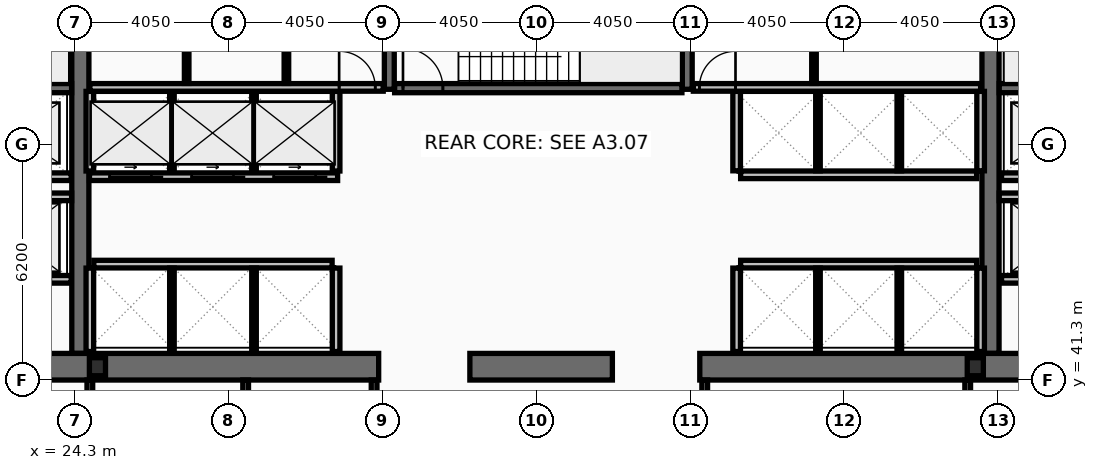
"""IFC4 building model, lengths in metres.
Left out: names, types, materials, properties, quantities, classifications, styles, units other than length and angle.
Written with IfcOpenShell. Run it as: python <this file> out.ifc"""

import sys

from ifc_helpers import new_model, si_unit, direction, frame, frame_2d, origin, origin_2d, place, context, subcontext, project, spatial, rectangle, i_section, extrude, element, fill, save


model = new_model("IFC4")
c1 = context("Model", 3, precision=1e-05, world=origin(), true_north=direction((0.0, 1.0)))
c2 = subcontext(c1, "Body", "Model", "MODEL_VIEW")
j1 = project(units=[si_unit("LENGTHUNIT", "METRE"), si_unit("PLANEANGLEUNIT", "RADIAN")], contexts=[c1])
p1 = place(None, origin())
s1 = spatial("IfcSite", under=j1, at=p1, CompositionType="ELEMENT")
p2 = place(p1, origin())
s2 = spatial("IfcBuilding", under=s1, at=p2, CompositionType="ELEMENT")
p3 = place(p2, frame((0.0, 0.0, 102.6)))
s3 = spatial("IfcBuildingStorey", under=s2, at=p3, CompositionType="ELEMENT", Elevation=102.6)
for number, where, z_axis, x_axis in (
    (1, (24.45, 42.0, 0.0), (0.0, 0.0, 1.0), (0.0, 1.0, 0.0)),
    (2, (48.4, 42.0, 0.0), (0.0, 0.0, 1.0), (0.0, 1.0, 0.0)),
):
    element("IfcWall", number, at=place(p3, frame(where, z_axis=z_axis, x_axis=x_axis)), inside=s3, PredefinedType="SHEAR", context=c2, shape_type="SweptSolid", body=[
        extrude(rectangle(XDim=11.0, YDim=0.45, at=frame_2d((5.5, 0.0))), origin(), (0.0, 0.0, 1.0), 3.8),
    ])
p4 = place(p3, frame((32.3, 41.65, 0.0), z_axis=(0.0, 0.0, 1.0), x_axis=(-1.0, 0.0, 0.0)))
e3 = element("IfcWall", 3, at=p4, inside=s3, PredefinedType="SHEAR", context=c2, shape_type="SweptSolid", body=[
    extrude(rectangle(XDim=11.45, YDim=0.7, at=frame_2d((5.725, 0.0))), origin(), (0.0, 0.0, 1.0), 3.8),
])
p5 = place(p3, frame((38.45, 41.65, 0.0), z_axis=(0.0, 0.0, 1.0), x_axis=(-1.0, 0.0, 0.0)))
e4 = element("IfcWall", 4, at=p5, inside=s3, PredefinedType="SHEAR", context=c2, shape_type="SweptSolid", body=[
    extrude(rectangle(XDim=3.75, YDim=0.7, at=frame_2d((1.875, 0.0))), origin(), (0.0, 0.0, 1.0), 3.8),
])
p6 = place(p3, frame((52.05, 41.65, 0.0), z_axis=(0.0, 0.0, 1.0), x_axis=(-1.0, 0.0, 0.0)))
e5 = element("IfcWall", 5, at=p6, inside=s3, PredefinedType="SHEAR", context=c2, shape_type="SweptSolid", body=[
    extrude(rectangle(XDim=11.3, YDim=0.7, at=frame_2d((5.65, 0.0))), origin(), (0.0, 0.0, 1.0), 3.8),
])
for number, where, z_axis, x_axis in (
    (6, (32.58, 48.95, 0.0), (0.0, 0.0, 1.0), (0.0, 1.0, 0.0)),
    (7, (40.42, 48.95, 0.0), (0.0, 0.0, 1.0), (0.0, 1.0, 0.0)),
):
    element("IfcWall", number, at=place(p3, frame(where, z_axis=z_axis, x_axis=x_axis)), inside=s3, PredefinedType="SHEAR", context=c2, shape_type="SweptSolid", body=[
        extrude(rectangle(XDim=4.05, YDim=0.26, at=frame_2d((2.025, 0.0))), origin(), (0.0, 0.0, 1.0), 3.8),
    ])
p7 = place(p3, frame((16.9, 48.98, 0.0), z_axis=(0.0, 0.0, 1.0), x_axis=(1.0, 0.0, 0.0)))
e8 = element("IfcWall", 8, at=p7, inside=s3, PredefinedType="SHEAR", context=c2, shape_type="SweptSolid", body=[
    extrude(rectangle(XDim=7.32, YDim=0.24, at=frame_2d((3.66, 0.0))), origin(), (0.0, 0.0, 1.0), 3.8),
])
p8 = place(p7, frame((0.22, 0.0, 0.0)))
e9 = element("IfcOpeningElement", 9, at=p8, cuts=e8, PredefinedType="OPENING", context=c2, shape_type="SweptSolid", body=[
    extrude(rectangle(XDim=1.05, YDim=2.15, at=frame_2d((0.525, 1.075))), frame((0.0, 0.13, 0.0), z_axis=(0.0, -1.0, 0.0), x_axis=(1.0, 0.0, 0.0)), (0.0, 0.0, 1.0), 0.26),
])
p9 = place(p3, frame((48.63, 48.98, 0.0), z_axis=(0.0, 0.0, 1.0), x_axis=(1.0, 0.0, 0.0)))
e10 = element("IfcWall", 10, at=p9, inside=s3, PredefinedType="SHEAR", context=c2, shape_type="SweptSolid", body=[
    extrude(rectangle(XDim=7.37, YDim=0.24, at=frame_2d((3.685, 0.0))), origin(), (0.0, 0.0, 1.0), 3.8),
])
p10 = place(p9, frame((6.1, 0.0, 0.0)))
e11 = element("IfcOpeningElement", 11, at=p10, cuts=e10, PredefinedType="OPENING", context=c2, shape_type="SweptSolid", body=[
    extrude(rectangle(XDim=1.05, YDim=2.15, at=frame_2d((0.525, 1.075))), frame((0.0, 0.13, 0.0), z_axis=(0.0, -1.0, 0.0), x_axis=(1.0, 0.0, 0.0)), (0.0, 0.0, 1.0), 0.26),
])
p11 = place(p3, frame((32.72, 48.98, 0.0), z_axis=(0.0, 0.0, 1.0), x_axis=(1.0, 0.0, 0.0)))
e12 = element("IfcWall", 12, at=p11, inside=s3, PredefinedType="SHEAR", context=c2, shape_type="SweptSolid", body=[
    extrude(rectangle(XDim=7.56, YDim=0.24, at=frame_2d((3.78, 0.0))), origin(), (0.0, 0.0, 1.0), 3.8),
])
p12 = place(p11, frame((0.22, 0.0, 0.0)))
e13 = element("IfcOpeningElement", 13, at=p12, cuts=e12, PredefinedType="OPENING", context=c2, shape_type="SweptSolid", body=[
    extrude(rectangle(XDim=1.05, YDim=2.15, at=frame_2d((0.525, 1.075))), frame((0.0, 0.13, 0.0), z_axis=(0.0, -1.0, 0.0), x_axis=(1.0, 0.0, 0.0)), (0.0, 0.0, 1.0), 0.26),
])
for number, where, z_axis, x_axis in (
    (14, (24.9, 41.65, 0.0), (0.0, 0.0, 1.0), (1.0, 0.0, 0.0)),
    (15, (48.0, 41.65, 0.0), (0.0, 0.0, 1.0), (1.0, 0.0, 0.0)),
):
    element("IfcColumn", number, at=place(p3, frame(where, z_axis=z_axis, x_axis=x_axis)), inside=s3, PredefinedType="COLUMN", context=c2, shape_type="SweptSolid", body=[
        extrude(i_section(OverallWidth=0.424, OverallDepth=0.474, WebThickness=0.048, FlangeThickness=0.077, at=origin_2d()), origin(), (0.0, 0.0, 1.0), 4.0),
    ])
p13 = place(p3, frame((51.61, 43.95, 0.0), z_axis=(0.0, 0.0, 1.0), x_axis=(-1.0, 0.0, 0.0)))
e16 = element("IfcWall", 16, at=p13, inside=s3, PredefinedType="PARTITIONING", context=c2, shape_type="SweptSolid", body=[
    extrude(rectangle(XDim=2.92, YDim=0.2, at=frame_2d((1.46, 0.0))), origin(), (0.0, 0.0, 1.0), 3.8),
])
p14 = place(p13, frame((0.81, 0.0, 0.0)))
e17 = element("IfcOpeningElement", 17, at=p14, cuts=e16, PredefinedType="OPENING", context=c2, shape_type="SweptSolid", body=[
    extrude(rectangle(XDim=1.3, YDim=2.18, at=frame_2d((0.65, 1.09))), frame((0.0, 0.11, 0.0), z_axis=(0.0, -1.0, 0.0), x_axis=(1.0, 0.0, 0.0)), (0.0, 0.0, 1.0), 0.22),
])
p15 = place(p3, frame((24.21, 43.95, 0.0), z_axis=(0.0, 0.0, 1.0), x_axis=(-1.0, 0.0, 0.0)))
e18 = element("IfcWall", 18, at=p15, inside=s3, PredefinedType="PARTITIONING", context=c2, shape_type="SweptSolid", body=[
    extrude(rectangle(XDim=2.97, YDim=0.2, at=frame_2d((1.485, 0.0))), origin(), (0.0, 0.0, 1.0), 3.8),
])
p16 = place(p15, frame((0.86, 0.0, 0.0)))
e19 = element("IfcOpeningElement", 19, at=p16, cuts=e18, PredefinedType="OPENING", context=c2, shape_type="SweptSolid", body=[
    extrude(rectangle(XDim=1.3, YDim=2.18, at=frame_2d((0.65, 1.09))), frame((0.0, 0.11, 0.0), z_axis=(0.0, -1.0, 0.0), x_axis=(1.0, 0.0, 0.0)), (0.0, 0.0, 1.0), 0.22),
])
p17 = place(p3, frame((51.61, 46.65, 0.0), z_axis=(0.0, 0.0, 1.0), x_axis=(-1.0, 0.0, 0.0)))
e20 = element("IfcWall", 20, at=p17, inside=s3, PredefinedType="PARTITIONING", context=c2, shape_type="SweptSolid", body=[
    extrude(rectangle(XDim=2.92, YDim=0.2, at=frame_2d((1.46, 0.0))), origin(), (0.0, 0.0, 1.0), 3.8),
])
p18 = place(p17, frame((0.86, 0.0, 0.0)))
e21 = element("IfcOpeningElement", 21, at=p18, cuts=e20, PredefinedType="OPENING", context=c2, shape_type="SweptSolid", body=[
    extrude(rectangle(XDim=1.2, YDim=2.18, at=frame_2d((0.6, 1.09))), frame((0.0, 0.11, 0.0), z_axis=(0.0, -1.0, 0.0), x_axis=(1.0, 0.0, 0.0)), (0.0, 0.0, 1.0), 0.22),
])
p19 = place(p3, frame((24.21, 46.65, 0.0), z_axis=(0.0, 0.0, 1.0), x_axis=(-1.0, 0.0, 0.0)))
e22 = element("IfcWall", 22, at=p19, inside=s3, PredefinedType="PARTITIONING", context=c2, shape_type="SweptSolid", body=[
    extrude(rectangle(XDim=2.97, YDim=0.2, at=frame_2d((1.485, 0.0))), origin(), (0.0, 0.0, 1.0), 3.8),
])
p20 = place(p19, frame((0.91, 0.0, 0.0)))
e23 = element("IfcOpeningElement", 23, at=p20, cuts=e22, PredefinedType="OPENING", context=c2, shape_type="SweptSolid", body=[
    extrude(rectangle(XDim=1.2, YDim=2.18, at=frame_2d((0.6, 1.09))), frame((0.0, 0.11, 0.0), z_axis=(0.0, -1.0, 0.0), x_axis=(1.0, 0.0, 0.0)), (0.0, 0.0, 1.0), 0.22),
])
p21 = place(p3, frame((31.22, 46.65, 0.0), z_axis=(0.0, 0.0, 1.0), x_axis=(-1.0, 0.0, 0.0)))
e24 = element("IfcWall", 24, at=p21, inside=s3, PredefinedType="PARTITIONING", context=c2, shape_type="SweptSolid", body=[
    extrude(rectangle(XDim=6.53, YDim=0.2, at=frame_2d((3.265, 0.0))), origin(), (0.0, 0.0, 1.0), 3.8),
])
p22 = place(p21, frame((4.9, 0.0, 0.0)))
e25 = element("IfcOpeningElement", 25, at=p22, cuts=e24, PredefinedType="OPENING", context=c2, shape_type="SweptSolid", body=[
    extrude(rectangle(XDim=1.1, YDim=2.18, at=frame_2d((0.55, 1.09))), frame((0.0, 0.11, 0.0), z_axis=(0.0, -1.0, 0.0), x_axis=(1.0, 0.0, 0.0)), (0.0, 0.0, 1.0), 0.22),
])
p23 = place(p21, frame((2.74, 0.0, 0.0)))
e26 = element("IfcOpeningElement", 26, at=p23, cuts=e24, PredefinedType="OPENING", context=c2, shape_type="SweptSolid", body=[
    extrude(rectangle(XDim=1.1, YDim=2.18, at=frame_2d((0.55, 1.09))), frame((0.0, 0.11, 0.0), z_axis=(0.0, -1.0, 0.0), x_axis=(1.0, 0.0, 0.0)), (0.0, 0.0, 1.0), 0.22),
])
p24 = place(p21, frame((0.58, 0.0, 0.0)))
e27 = element("IfcOpeningElement", 27, at=p24, cuts=e24, PredefinedType="OPENING", context=c2, shape_type="SweptSolid", body=[
    extrude(rectangle(XDim=1.1, YDim=2.18, at=frame_2d((0.55, 1.09))), frame((0.0, 0.11, 0.0), z_axis=(0.0, -1.0, 0.0), x_axis=(1.0, 0.0, 0.0)), (0.0, 0.0, 1.0), 0.22),
])
p25 = place(p3, frame((21.2, 46.12, 0.0), z_axis=(0.0, 0.0, 1.0), x_axis=(1.0, 0.0, 0.0)))
e28 = element("IfcWall", 28, at=p25, inside=s3, PredefinedType="PARTITIONING", context=c2, shape_type="SweptSolid", body=[
    extrude(rectangle(XDim=3.02, YDim=0.2, at=frame_2d((1.51, 0.0))), origin(), (0.0, 0.0, 1.0), 3.8),
])
p26 = place(p3, frame((48.63, 46.12, 0.0), z_axis=(0.0, 0.0, 1.0), x_axis=(1.0, 0.0, 0.0)))
e29 = element("IfcWall", 29, at=p26, inside=s3, PredefinedType="PARTITIONING", context=c2, shape_type="SweptSolid", body=[
    extrude(rectangle(XDim=3.07, YDim=0.2, at=frame_2d((1.535, 0.0))), origin(), (0.0, 0.0, 1.0), 3.8),
])
for number, where, z_axis, x_axis in (
    (30, (24.7, 46.8, 0.0), (0.0, 0.0, 1.0), (0.0, 1.0, 0.0)),
    (31, (31.18, 46.8, 0.0), (0.0, 0.0, 1.0), (0.0, 1.0, 0.0)),
):
    element("IfcWall", number, at=place(p3, frame(where, z_axis=z_axis, x_axis=x_axis)), inside=s3, PredefinedType="PARTITIONING", context=c2, shape_type="SweptSolid", body=[
        extrude(rectangle(XDim=2.095, YDim=0.2, at=frame_2d((1.047, 0.0))), origin(), (0.0, 0.0, 1.0), 3.8),
    ])
for number, where, z_axis, x_axis in (
    (32, (26.86, 46.8, 0.0), (0.0, 0.0, 1.0), (0.0, 1.0, 0.0)),
    (33, (29.02, 46.8, 0.0), (0.0, 0.0, 1.0), (0.0, 1.0, 0.0)),
):
    element("IfcWall", number, at=place(p3, frame(where, z_axis=z_axis, x_axis=x_axis)), inside=s3, PredefinedType="PARTITIONING", context=c2, shape_type="SweptSolid", body=[
        extrude(rectangle(XDim=2.095, YDim=0.12, at=frame_2d((1.047, 0.0))), origin(), (0.0, 0.0, 1.0), 3.8),
    ])
p27 = place(p3, frame((24.805, 44.35, 0.0), z_axis=(0.0, 0.0, 1.0), x_axis=(1.0, 0.0, 0.0)))
e34 = element("IfcWall", 34, at=p27, inside=s3, PredefinedType="PARTITIONING", context=c2, shape_type="SweptSolid", body=[
    extrude(rectangle(XDim=6.27, YDim=0.2, at=frame_2d((3.135, 0.0))), origin(), (0.0, 0.0, 1.0), 3.8),
])
for number, where, z_axis, x_axis in (
    (35, (24.7, 42.05, 0.0), (0.0, 0.0, 1.0), (0.0, 1.0, 0.0)),
    (36, (31.18, 42.05, 0.0), (0.0, 0.0, 1.0), (0.0, 1.0, 0.0)),
):
    element("IfcWall", number, at=place(p3, frame(where, z_axis=z_axis, x_axis=x_axis)), inside=s3, PredefinedType="PARTITIONING", context=c2, shape_type="SweptSolid", body=[
        extrude(rectangle(XDim=2.195, YDim=0.2, at=frame_2d((1.098, 0.0))), origin(), (0.0, 0.0, 1.0), 3.8),
    ])
for number, where, z_axis, x_axis in (
    (37, (26.86, 42.05, 0.0), (0.0, 0.0, 1.0), (0.0, 1.0, 0.0)),
    (38, (29.02, 42.05, 0.0), (0.0, 0.0, 1.0), (0.0, 1.0, 0.0)),
):
    element("IfcWall", number, at=place(p3, frame(where, z_axis=z_axis, x_axis=x_axis)), inside=s3, PredefinedType="PARTITIONING", context=c2, shape_type="SweptSolid", body=[
        extrude(rectangle(XDim=2.195, YDim=0.12, at=frame_2d((1.098, 0.0))), origin(), (0.0, 0.0, 1.0), 3.8),
    ])
p28 = place(p3, frame((41.825, 46.7, 0.0), z_axis=(0.0, 0.0, 1.0), x_axis=(1.0, 0.0, 0.0)))
e39 = element("IfcWall", 39, at=p28, inside=s3, PredefinedType="PARTITIONING", context=c2, shape_type="SweptSolid", body=[
    extrude(rectangle(XDim=6.21, YDim=0.2, at=frame_2d((3.105, 0.0))), origin(), (0.0, 0.0, 1.0), 3.8),
])
for number, where, z_axis, x_axis in (
    (40, (41.72, 46.805, 0.0), (0.0, 0.0, 1.0), (0.0, 1.0, 0.0)),
    (41, (48.14, 46.805, 0.0), (0.0, 0.0, 1.0), (0.0, 1.0, 0.0)),
):
    element("IfcWall", number, at=place(p3, frame(where, z_axis=z_axis, x_axis=x_axis)), inside=s3, PredefinedType="PARTITIONING", context=c2, shape_type="SweptSolid", body=[
        extrude(rectangle(XDim=2.09, YDim=0.2, at=frame_2d((1.045, 0.0))), origin(), (0.0, 0.0, 1.0), 3.8),
    ])
for number, where, z_axis, x_axis in (
    (42, (43.86, 46.805, 0.0), (0.0, 0.0, 1.0), (0.0, 1.0, 0.0)),
    (43, (46.0, 46.805, 0.0), (0.0, 0.0, 1.0), (0.0, 1.0, 0.0)),
):
    element("IfcWall", number, at=place(p3, frame(where, z_axis=z_axis, x_axis=x_axis)), inside=s3, PredefinedType="PARTITIONING", context=c2, shape_type="SweptSolid", body=[
        extrude(rectangle(XDim=2.09, YDim=0.12, at=frame_2d((1.045, 0.0))), origin(), (0.0, 0.0, 1.0), 3.8),
    ])
p29 = place(p3, frame((41.825, 44.35, 0.0), z_axis=(0.0, 0.0, 1.0), x_axis=(1.0, 0.0, 0.0)))
e44 = element("IfcWall", 44, at=p29, inside=s3, PredefinedType="PARTITIONING", context=c2, shape_type="SweptSolid", body=[
    extrude(rectangle(XDim=6.21, YDim=0.2, at=frame_2d((3.105, 0.0))), origin(), (0.0, 0.0, 1.0), 3.8),
])
for number, where, z_axis, x_axis in (
    (45, (41.72, 42.05, 0.0), (0.0, 0.0, 1.0), (0.0, 1.0, 0.0)),
    (46, (48.14, 42.05, 0.0), (0.0, 0.0, 1.0), (0.0, 1.0, 0.0)),
):
    element("IfcWall", number, at=place(p3, frame(where, z_axis=z_axis, x_axis=x_axis)), inside=s3, PredefinedType="PARTITIONING", context=c2, shape_type="SweptSolid", body=[
        extrude(rectangle(XDim=2.195, YDim=0.2, at=frame_2d((1.098, 0.0))), origin(), (0.0, 0.0, 1.0), 3.8),
    ])
for number, where, z_axis, x_axis in (
    (47, (43.86, 42.05, 0.0), (0.0, 0.0, 1.0), (0.0, 1.0, 0.0)),
    (48, (46.0, 42.05, 0.0), (0.0, 0.0, 1.0), (0.0, 1.0, 0.0)),
):
    element("IfcWall", number, at=place(p3, frame(where, z_axis=z_axis, x_axis=x_axis)), inside=s3, PredefinedType="PARTITIONING", context=c2, shape_type="SweptSolid", body=[
        extrude(rectangle(XDim=2.195, YDim=0.12, at=frame_2d((1.098, 0.0))), origin(), (0.0, 0.0, 1.0), 3.8),
    ])
p30 = place(p3, frame((24.7, 49.0, 0.0), z_axis=(0.0, 0.0, 1.0), x_axis=(1.0, 0.0, 0.0)))
e49 = element("IfcWall", 49, at=p30, inside=s3, PredefinedType="PARTITIONING", context=c2, shape_type="SweptSolid", body=[
    extrude(rectangle(XDim=7.72, YDim=0.2, at=frame_2d((3.86, 0.0))), origin(), (0.0, 0.0, 1.0), 3.8),
])
p31 = place(p30, frame((6.56, 0.0, 0.0)))
e50 = element("IfcOpeningElement", 50, at=p31, cuts=e49, PredefinedType="OPENING", context=c2, shape_type="SweptSolid", body=[
    extrude(rectangle(XDim=0.95, YDim=2.1, at=frame_2d((0.475, 1.05))), frame((0.0, 0.11, 0.0), z_axis=(0.0, -1.0, 0.0), x_axis=(1.0, 0.0, 0.0)), (0.0, 0.0, 1.0), 0.22),
])
p32 = place(p3, frame((27.248, 49.105, 0.0), z_axis=(0.0, 0.0, 1.0), x_axis=(0.0, 1.0, 0.0)))
e51 = element("IfcWall", 51, at=p32, inside=s3, PredefinedType="PARTITIONING", context=c2, shape_type="SweptSolid", body=[
    extrude(rectangle(XDim=3.69, YDim=0.12, at=frame_2d((1.845, 0.0))), origin(), (0.0, 0.0, 1.0), 3.8),
])
p33 = place(p32, frame((1.05, 0.0, 0.0)))
e52 = element("IfcOpeningElement", 52, at=p33, cuts=e51, PredefinedType="OPENING", context=c2, shape_type="SweptSolid", body=[
    extrude(rectangle(XDim=0.9, YDim=2.05, at=frame_2d((0.45, 1.025))), frame((0.0, 0.07, 0.0), z_axis=(0.0, -1.0, 0.0), x_axis=(1.0, 0.0, 0.0)), (0.0, 0.0, 1.0), 0.14),
])
p34 = place(p3, frame((29.872, 49.105, 0.0), z_axis=(0.0, 0.0, 1.0), x_axis=(0.0, 1.0, 0.0)))
e53 = element("IfcWall", 53, at=p34, inside=s3, PredefinedType="PARTITIONING", context=c2, shape_type="SweptSolid", body=[
    extrude(rectangle(XDim=3.69, YDim=0.12, at=frame_2d((1.845, 0.0))), origin(), (0.0, 0.0, 1.0), 3.8),
])
p35 = place(p34, frame((1.05, 0.0, 0.0)))
e54 = element("IfcOpeningElement", 54, at=p35, cuts=e53, PredefinedType="OPENING", context=c2, shape_type="SweptSolid", body=[
    extrude(rectangle(XDim=0.9, YDim=2.05, at=frame_2d((0.45, 1.025))), frame((0.0, 0.07, 0.0), z_axis=(0.0, -1.0, 0.0), x_axis=(1.0, 0.0, 0.0)), (0.0, 0.0, 1.0), 0.14),
])
p36 = place(p3, frame((40.58, 49.0, 0.0), z_axis=(0.0, 0.0, 1.0), x_axis=(1.0, 0.0, 0.0)))
e55 = element("IfcWall", 55, at=p36, inside=s3, PredefinedType="PARTITIONING", context=c2, shape_type="SweptSolid", body=[
    extrude(rectangle(XDim=7.56, YDim=0.2, at=frame_2d((3.78, 0.0))), origin(), (0.0, 0.0, 1.0), 3.8),
])
p37 = place(p36, frame((0.16, 0.0, 0.0)))
e56 = element("IfcOpeningElement", 56, at=p37, cuts=e55, PredefinedType="OPENING", context=c2, shape_type="SweptSolid", body=[
    extrude(rectangle(XDim=0.95, YDim=2.1, at=frame_2d((0.475, 1.05))), frame((0.0, 0.11, 0.0), z_axis=(0.0, -1.0, 0.0), x_axis=(1.0, 0.0, 0.0)), (0.0, 0.0, 1.0), 0.22),
])
p38 = place(p3, frame((43.755, 49.105, 0.0), z_axis=(0.0, 0.0, 1.0), x_axis=(0.0, 1.0, 0.0)))
e57 = element("IfcWall", 57, at=p38, inside=s3, PredefinedType="PARTITIONING", context=c2, shape_type="SweptSolid", body=[
    extrude(rectangle(XDim=3.69, YDim=0.12, at=frame_2d((1.845, 0.0))), origin(), (0.0, 0.0, 1.0), 3.8),
])
p39 = place(p38, frame((1.05, 0.0, 0.0)))
e58 = element("IfcOpeningElement", 58, at=p39, cuts=e57, PredefinedType="OPENING", context=c2, shape_type="SweptSolid", body=[
    extrude(rectangle(XDim=0.9, YDim=2.05, at=frame_2d((0.45, 1.025))), frame((0.0, 0.07, 0.0), z_axis=(0.0, -1.0, 0.0), x_axis=(1.0, 0.0, 0.0)), (0.0, 0.0, 1.0), 0.14),
])
p40 = place(p3, frame((24.7, 38.28, 0.0), z_axis=(0.0, 0.0, 1.0), x_axis=(0.0, 1.0, 0.0)))
e59 = element("IfcWall", 59, at=p40, inside=s3, PredefinedType="PARTITIONING", context=c2, shape_type="SweptSolid", body=[
    extrude(rectangle(XDim=3.02, YDim=0.15, at=frame_2d((1.51, 0.0))), origin(), (0.0, 0.0, 1.0), 2.99),
])
for number, where, z_axis, x_axis in (
    (60, (28.8, 38.28, 0.0), (0.0, 0.0, 1.0), (0.0, 1.0, 0.0)),
    (61, (32.18, 38.28, 0.0), (0.0, 0.0, 1.0), (0.0, 1.0, 0.0)),
    (62, (40.88, 38.28, 0.0), (0.0, 0.0, 1.0), (0.0, 1.0, 0.0)),
):
    element("IfcWall", number, at=place(p3, frame(where, z_axis=z_axis, x_axis=x_axis)), inside=s3, PredefinedType="PARTITIONING", context=c2, shape_type="SweptSolid", body=[
        extrude(rectangle(XDim=3.02, YDim=0.15, at=frame_2d((1.51, 0.0))), origin(), (0.0, 0.0, 1.0), 3.8),
    ])
p41 = place(p3, frame((47.8, 38.28, 0.0), z_axis=(0.0, 0.0, 1.0), x_axis=(0.0, 1.0, 0.0)))
e63 = element("IfcWall", 63, at=p41, inside=s3, PredefinedType="PARTITIONING", context=c2, shape_type="SweptSolid", body=[
    extrude(rectangle(XDim=3.02, YDim=0.15, at=frame_2d((1.51, 0.0))), origin(), (0.0, 0.0, 1.0), 2.99),
])
p42 = place(p12, origin())
e64 = element("IfcDoor", 64, at=p42, inside=s3, OperationType="SINGLE_SWING_LEFT", PredefinedType="DOOR", context=c2, shape_type="SweptSolid", body=[
    extrude(rectangle(XDim=1.05, YDim=2.15, at=frame_2d((0.525, 1.075))), frame((0.0, 0.025, 0.0), z_axis=(0.0, -1.0, 0.0), x_axis=(1.0, 0.0, 0.0)), (0.0, 0.0, 1.0), 0.05),
])
fill(e13, e64)
p43 = place(p22, origin())
e65 = element("IfcDoor", 65, at=p43, inside=s3, OperationType="SLIDING_TO_LEFT", PredefinedType="DOOR", context=c2, shape_type="SweptSolid", body=[
    extrude(rectangle(XDim=1.1, YDim=2.18, at=frame_2d((0.55, 1.09))), frame((0.0, 0.025, 0.0), z_axis=(0.0, -1.0, 0.0), x_axis=(1.0, 0.0, 0.0)), (0.0, 0.0, 1.0), 0.05),
])
fill(e25, e65)
p44 = place(p23, origin())
e66 = element("IfcDoor", 66, at=p44, inside=s3, OperationType="SLIDING_TO_LEFT", PredefinedType="DOOR", context=c2, shape_type="SweptSolid", body=[
    extrude(rectangle(XDim=1.1, YDim=2.18, at=frame_2d((0.55, 1.09))), frame((0.0, 0.025, 0.0), z_axis=(0.0, -1.0, 0.0), x_axis=(1.0, 0.0, 0.0)), (0.0, 0.0, 1.0), 0.05),
])
fill(e26, e66)
p45 = place(p24, origin())
e67 = element("IfcDoor", 67, at=p45, inside=s3, OperationType="SLIDING_TO_LEFT", PredefinedType="DOOR", context=c2, shape_type="SweptSolid", body=[
    extrude(rectangle(XDim=1.1, YDim=2.18, at=frame_2d((0.55, 1.09))), frame((0.0, 0.025, 0.0), z_axis=(0.0, -1.0, 0.0), x_axis=(1.0, 0.0, 0.0)), (0.0, 0.0, 1.0), 0.05),
])
fill(e27, e67)
p46 = place(p31, origin())
e68 = element("IfcDoor", 68, at=p46, inside=s3, OperationType="SINGLE_SWING_LEFT", PredefinedType="DOOR", context=c2, shape_type="SweptSolid", body=[
    extrude(rectangle(XDim=0.95, YDim=2.1, at=frame_2d((0.475, 1.05))), frame((0.0, 0.025, 0.0), z_axis=(0.0, -1.0, 0.0), x_axis=(1.0, 0.0, 0.0)), (0.0, 0.0, 1.0), 0.05),
])
fill(e50, e68)
p47 = place(p37, origin())
e69 = element("IfcDoor", 69, at=p47, inside=s3, OperationType="SINGLE_SWING_RIGHT", PredefinedType="DOOR", context=c2, shape_type="SweptSolid", body=[
    extrude(rectangle(XDim=0.95, YDim=2.1, at=frame_2d((0.475, 1.05))), frame((0.0, 0.025, 0.0), z_axis=(0.0, -1.0, 0.0), x_axis=(1.0, 0.0, 0.0)), (0.0, 0.0, 1.0), 0.05),
])
fill(e56, e69)
save(model, sys.argv[1])
